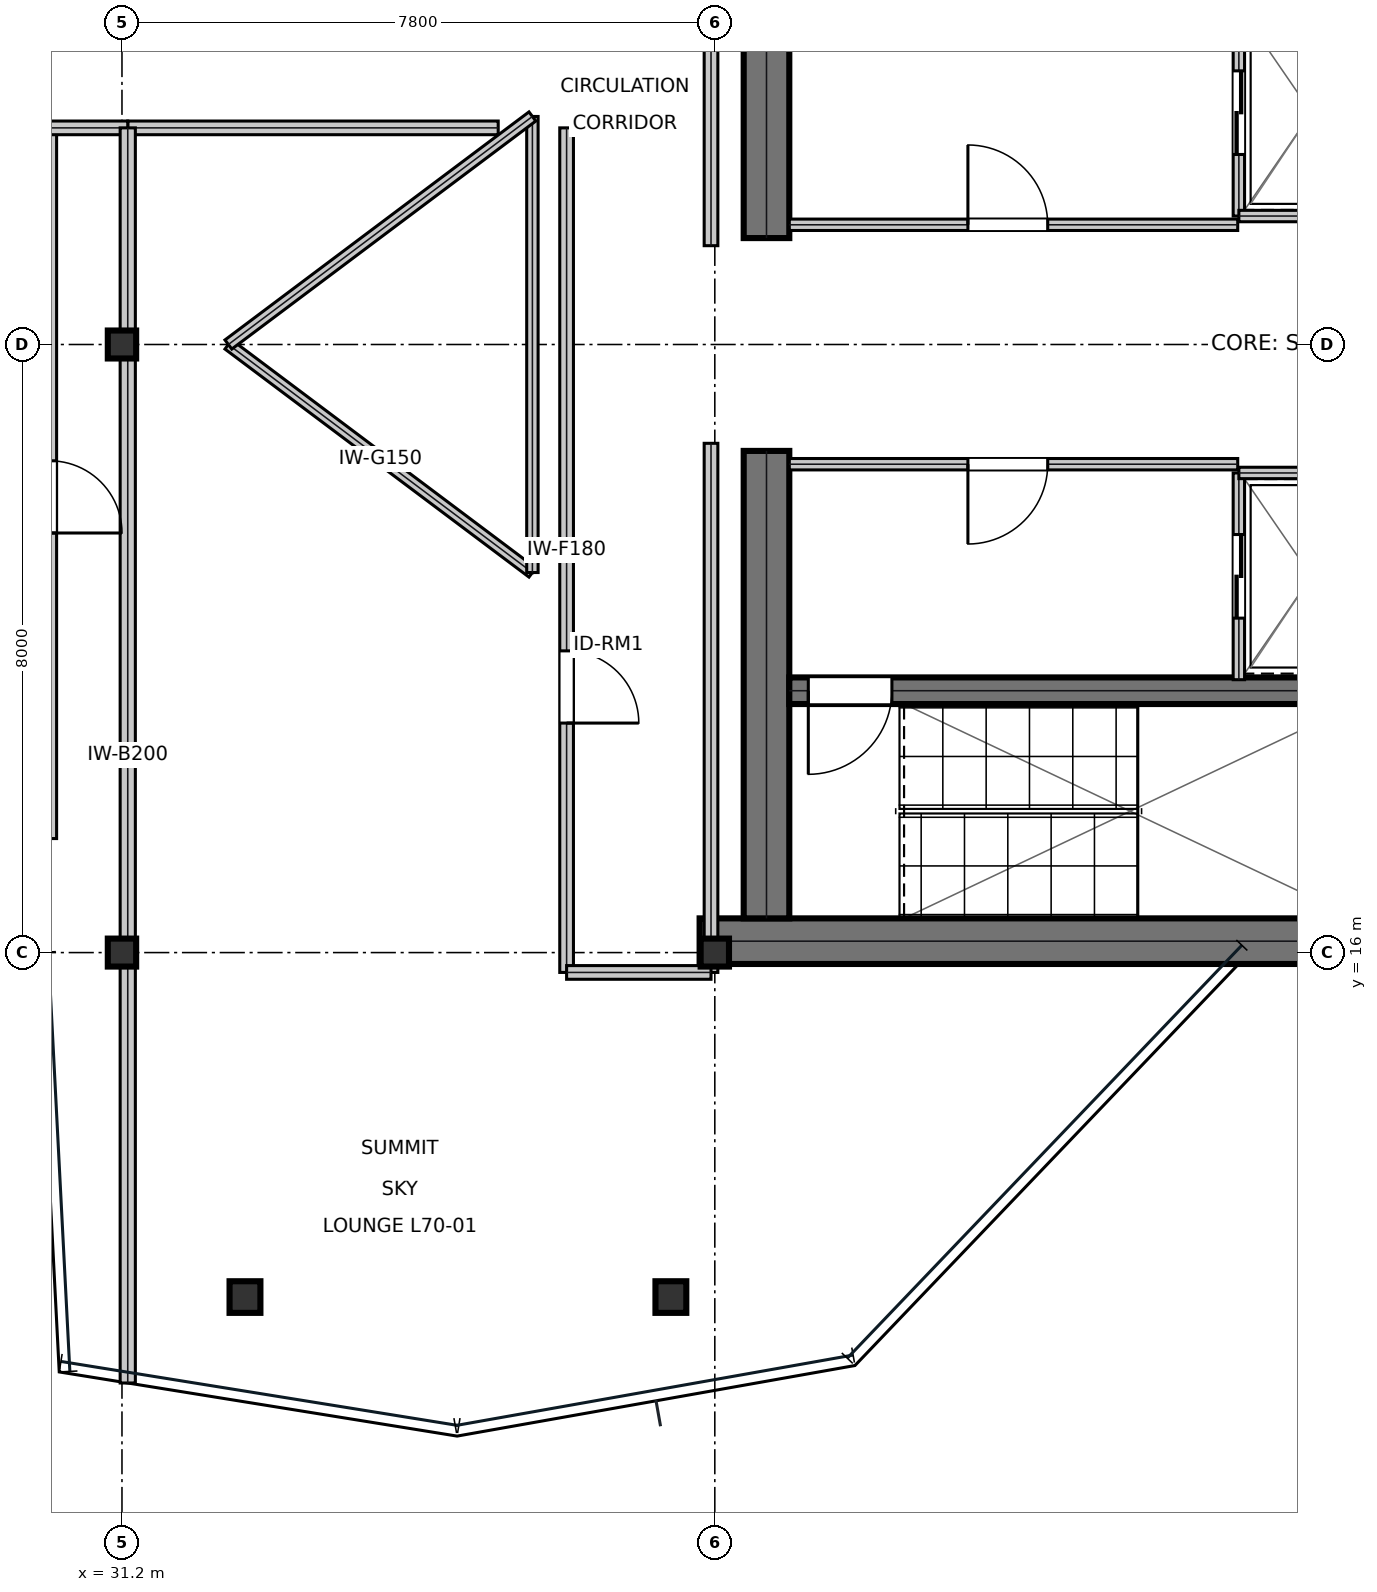
"""IFC4 building model, lengths in metres.
Left out: names, types, materials, properties, quantities, classifications, styles, units other than length and angle.
Written with IfcOpenShell. Run it as: python <this file> out.ifc"""

import sys

from ifc_helpers import new_model, si_unit, direction, frame, frame_2d, origin, origin_2d, place, context, subcontext, project, spatial, rectangle, i_section, extrude, element, fill, save


model = new_model("IFC4")
c1 = context("Model", 3, precision=1e-05, world=origin(), true_north=direction((0.0, 1.0)))
c2 = subcontext(c1, "Body", "Model", "MODEL_VIEW")
j1 = project(units=[si_unit("LENGTHUNIT", "METRE"), si_unit("PLANEANGLEUNIT", "RADIAN")], contexts=[c1])
p1 = place(None, origin())
s1 = spatial("IfcSite", under=j1, at=p1, CompositionType="ELEMENT")
p2 = place(p1, origin())
s2 = spatial("IfcBuilding", under=s1, at=p2, CompositionType="ELEMENT")
p3 = place(p2, frame((0.0, 0.0, 299.25)))
s3 = spatial("IfcBuildingStorey", under=s2, at=p3, CompositionType="ELEMENT", Elevation=299.25)
p4 = place(p3, frame((38.8, 16.15, 0.0), z_axis=(0.0, 0.0, 1.0), x_axis=(1.0, 0.0, 0.0)))
e1 = element("IfcWall", 1, at=p4, inside=s3, PredefinedType="SHEAR", context=c2, shape_type="SweptSolid", body=[
    extrude(rectangle(XDim=16.0, YDim=0.6, at=frame_2d((8.0, 0.0))), origin(), (0.0, 0.0, 1.0), 3.81),
])
for number, where, z_axis, x_axis in (
    (2, (39.68, 16.45, 0.0), (0.0, 0.0, 1.0), (0.0, 1.0, 0.0)),
    (3, (39.68, 25.4, 0.0), (0.0, 0.0, 1.0), (0.0, 1.0, 0.0)),
):
    element("IfcWall", number, at=place(p3, frame(where, z_axis=z_axis, x_axis=x_axis)), inside=s3, PredefinedType="SHEAR", context=c2, shape_type="SweptSolid", body=[
        extrude(rectangle(XDim=6.15, YDim=0.6, at=frame_2d((3.075, 0.0))), origin(), (0.0, 0.0, 1.0), 3.81),
    ])
p5 = place(p3, frame((39.98, 19.445, 0.0), z_axis=(0.0, 0.0, 1.0), x_axis=(1.0, 0.0, 0.0)))
e4 = element("IfcWall", 4, at=p5, inside=s3, PredefinedType="SHEAR", context=c2, shape_type="SweptSolid", body=[
    extrude(rectangle(XDim=7.71, YDim=0.35, at=frame_2d((3.855, 0.0))), origin(), (0.0, 0.0, 1.0), 3.81),
])
p6 = place(p5, frame((0.25, 0.0, 0.0)))
e5 = element("IfcOpeningElement", 5, at=p6, cuts=e4, PredefinedType="OPENING", context=c2, shape_type="SweptSolid", body=[
    extrude(rectangle(XDim=1.1, YDim=2.15, at=frame_2d((0.55, 1.075))), frame((0.0, 0.185, 0.0), z_axis=(0.0, -1.0, 0.0), x_axis=(1.0, 0.0, 0.0)), (0.0, 0.0, 1.0), 0.37),
])
for number, where, z_axis, x_axis in (
    (6, (31.2, 16.0, 0.0), (0.0, 0.0, 1.0), (1.0, 0.0, 0.0)),
    (7, (31.2, 24.0, 0.0), (0.0, 0.0, 1.0), (1.0, 0.0, 0.0)),
    (8, (39.0, 16.0, 0.0), (0.0, 0.0, 1.0), (1.0, 0.0, 0.0)),
):
    element("IfcColumn", number, at=place(p3, frame(where, z_axis=z_axis, x_axis=x_axis)), inside=s3, PredefinedType="COLUMN", context=c2, shape_type="SweptSolid", body=[
        extrude(i_section(OverallWidth=0.373, OverallDepth=0.368, WebThickness=0.015, FlangeThickness=0.024, at=origin_2d()), origin(), (0.0, 0.0, 1.0), 4.044),
    ])
p7 = place(p3, frame((32.818, 11.468, 0.016), z_axis=(0.013968236766, 0.029819148922, 0.999457706318), x_axis=(-0.905569653976, 0.424197597586, 0.0)))
e9 = element("IfcColumn", 9, at=p7, inside=s3, PredefinedType="COLUMN", context=c2, shape_type="SweptSolid", body=[
    extrude(i_section(OverallWidth=0.406, OverallDepth=0.416, WebThickness=0.03, FlangeThickness=0.048, at=origin_2d()), origin(), (0.0, 0.0, 1.0), 4.02),
])
p8 = place(p3, frame((38.422, 11.468, 0.016), z_axis=(-0.004980404192, 0.029821688517, 0.99954282673), x_axis=(-0.986339577116, -0.164724735893, 0.0)))
e10 = element("IfcColumn", 10, at=p8, inside=s3, PredefinedType="COLUMN", context=c2, shape_type="SweptSolid", body=[
    extrude(i_section(OverallWidth=0.406, OverallDepth=0.416, WebThickness=0.03, FlangeThickness=0.048, at=origin_2d()), origin(), (0.0, 0.0, 1.0), 4.02),
])
p9 = place(p3, frame((39.98, 25.575, 0.0), z_axis=(0.0, 0.0, 1.0), x_axis=(1.0, 0.0, 0.0)))
e11 = element("IfcWall", 11, at=p9, inside=s3, PredefinedType="PARTITIONING", context=c2, shape_type="SweptSolid", body=[
    extrude(rectangle(XDim=5.9, YDim=0.15, at=frame_2d((2.95, 0.0))), origin(), (0.0, 0.0, 1.0), 3.81),
])
p10 = place(p9, frame((2.35, 0.0, 0.0)))
e12 = element("IfcOpeningElement", 12, at=p10, cuts=e11, PredefinedType="OPENING", context=c2, shape_type="SweptSolid", body=[
    extrude(rectangle(XDim=1.05, YDim=2.15, at=frame_2d((0.525, 1.075))), frame((0.0, 0.085, 0.0), z_axis=(0.0, -1.0, 0.0), x_axis=(1.0, 0.0, 0.0)), (0.0, 0.0, 1.0), 0.17),
])
p11 = place(p3, frame((39.98, 22.425, 0.0), z_axis=(0.0, 0.0, 1.0), x_axis=(1.0, 0.0, 0.0)))
e13 = element("IfcWall", 13, at=p11, inside=s3, PredefinedType="PARTITIONING", context=c2, shape_type="SweptSolid", body=[
    extrude(rectangle(XDim=5.9, YDim=0.15, at=frame_2d((2.95, 0.0))), origin(), (0.0, 0.0, 1.0), 3.81),
])
p12 = place(p11, frame((2.35, 0.0, 0.0)))
e14 = element("IfcOpeningElement", 14, at=p12, cuts=e13, PredefinedType="OPENING", context=c2, shape_type="SweptSolid", body=[
    extrude(rectangle(XDim=1.05, YDim=2.15, at=frame_2d((0.525, 1.075))), frame((0.0, 0.085, 0.0), z_axis=(0.0, -1.0, 0.0), x_axis=(1.0, 0.0, 0.0)), (0.0, 0.0, 1.0), 0.17),
])
p13 = place(p3, frame((45.895, 25.69, 0.0), z_axis=(0.0, 0.0, 1.0), x_axis=(0.0, 1.0, 0.0)))
e15 = element("IfcWall", 15, at=p13, inside=s3, PredefinedType="PARTITIONING", context=c2, shape_type="SweptSolid", body=[
    extrude(rectangle(XDim=2.72, YDim=0.15, at=frame_2d((1.36, 0.0))), origin(), (0.0, 0.0, 1.0), 3.81),
])
p14 = place(p13, frame((0.81, 0.0, 0.0)))
e16 = element("IfcOpeningElement", 16, at=p14, cuts=e15, PredefinedType="OPENING", context=c2, shape_type="SweptSolid", body=[
    extrude(rectangle(XDim=1.1, YDim=2.15, at=frame_2d((0.55, 1.075))), frame((0.0, 0.085, 0.0), z_axis=(0.0, -1.0, 0.0), x_axis=(1.0, 0.0, 0.0)), (0.0, 0.0, 1.0), 0.17),
])
p15 = place(p3, frame((45.895, 25.69, 0.0), z_axis=(0.0, 0.0, 1.0), x_axis=(1.0, 0.0, 0.0)))
e17 = element("IfcWall", 17, at=p15, inside=s3, PredefinedType="PARTITIONING", context=c2, shape_type="SweptSolid", body=[
    extrude(rectangle(XDim=1.915, YDim=0.15, at=frame_2d((0.958, 0.0))), origin(), (0.0, 0.0, 1.0), 3.81),
])
p16 = place(p3, frame((45.895, 19.59, 0.0), z_axis=(0.0, 0.0, 1.0), x_axis=(0.0, 1.0, 0.0)))
e18 = element("IfcWall", 18, at=p16, inside=s3, PredefinedType="PARTITIONING", context=c2, shape_type="SweptSolid", body=[
    extrude(rectangle(XDim=2.72, YDim=0.15, at=frame_2d((1.36, 0.0))), origin(), (0.0, 0.0, 1.0), 3.81),
])
p17 = place(p16, frame((0.81, 0.0, 0.0)))
e19 = element("IfcOpeningElement", 19, at=p17, cuts=e18, PredefinedType="OPENING", context=c2, shape_type="SweptSolid", body=[
    extrude(rectangle(XDim=1.1, YDim=2.15, at=frame_2d((0.55, 1.075))), frame((0.0, 0.085, 0.0), z_axis=(0.0, -1.0, 0.0), x_axis=(1.0, 0.0, 0.0)), (0.0, 0.0, 1.0), 0.17),
])
p18 = place(p3, frame((45.895, 22.31, 0.0), z_axis=(0.0, 0.0, 1.0), x_axis=(1.0, 0.0, 0.0)))
e20 = element("IfcWall", 20, at=p18, inside=s3, PredefinedType="PARTITIONING", context=c2, shape_type="SweptSolid", body=[
    extrude(rectangle(XDim=1.915, YDim=0.15, at=frame_2d((0.958, 0.0))), origin(), (0.0, 0.0, 1.0), 3.81),
])
p19 = place(p3, frame((37.05, 15.739, 0.0), z_axis=(0.0, 0.0, 1.0), x_axis=(0.0, 1.0, 0.0)))
e21 = element("IfcWall", 21, at=p19, inside=s3, PredefinedType="SOLIDWALL", context=c2, shape_type="SweptSolid", body=[
    extrude(rectangle(XDim=11.111, YDim=0.18, at=frame_2d((5.556, 0.0))), origin(), (0.0, 0.0, 1.0), 3.27),
])
p20 = place(p19, frame((3.281, 0.0, 0.0)))
e22 = element("IfcOpeningElement", 22, at=p20, cuts=e21, PredefinedType="OPENING", context=c2, shape_type="SweptSolid", body=[
    extrude(rectangle(XDim=0.95, YDim=2.15, at=frame_2d((0.475, 1.075))), frame((0.0, 0.1, 0.0), z_axis=(0.0, -1.0, 0.0), x_axis=(1.0, 0.0, 0.0)), (0.0, 0.0, 1.0), 0.2),
])
p21 = place(p3, frame((30.25, 17.5, 0.0), z_axis=(0.0, 0.0, 1.0), x_axis=(0.0, 1.0, 0.0)))
e23 = element("IfcWall", 23, at=p21, inside=s3, PredefinedType="SOLIDWALL", context=c2, shape_type="SweptSolid", body=[
    extrude(rectangle(XDim=9.35, YDim=0.18, at=frame_2d((4.675, 0.0))), origin(), (0.0, 0.0, 1.0), 3.27),
])
p22 = place(p21, frame((4.02, 0.0, 0.0)))
e24 = element("IfcOpeningElement", 24, at=p22, cuts=e23, PredefinedType="OPENING", context=c2, shape_type="SweptSolid", body=[
    extrude(rectangle(XDim=0.95, YDim=2.15, at=frame_2d((0.475, 1.075))), frame((0.0, 0.1, 0.0), z_axis=(0.0, -1.0, 0.0), x_axis=(1.0, 0.0, 0.0)), (0.0, 0.0, 1.0), 0.2),
])
p23 = place(p3, frame((38.95, 15.739, 0.0), z_axis=(0.0, 0.0, 1.0), x_axis=(0.0, 1.0, 0.0)))
e25 = element("IfcWall", 25, at=p23, inside=s3, PredefinedType="SOLIDWALL", context=c2, shape_type="SweptSolid", body=[
    extrude(rectangle(XDim=6.961, YDim=0.18, at=frame_2d((3.48, 0.0))), origin(), (0.0, 0.0, 1.0), 3.27),
])
p24 = place(p3, frame((31.276, 26.85, 0.0), z_axis=(0.0, 0.0, 1.0), x_axis=(1.0, 0.0, 0.0)))
e26 = element("IfcWall", 26, at=p24, inside=s3, PredefinedType="SOLIDWALL", context=c2, shape_type="SweptSolid", body=[
    extrude(rectangle(XDim=4.874, YDim=0.18, at=frame_2d((2.437, 0.0))), origin(), (0.0, 0.0, 1.0), 3.81),
])
p25 = place(p3, frame((37.05, 15.739, 0.0), z_axis=(0.0, 0.0, 1.0), x_axis=(1.0, 0.0, 0.0)))
e27 = element("IfcWall", 27, at=p25, inside=s3, PredefinedType="SOLIDWALL", context=c2, shape_type="SweptSolid", body=[
    extrude(rectangle(XDim=1.9, YDim=0.18, at=frame_2d((0.95, 0.0))), origin(), (0.0, 0.0, 1.0), 3.27),
])
p26 = place(p3, frame((30.25, 26.85, 0.0), z_axis=(0.0, 0.0, 1.0), x_axis=(1.0, 0.0, 0.0)))
e28 = element("IfcWall", 28, at=p26, inside=s3, PredefinedType="SOLIDWALL", context=c2, shape_type="SweptSolid", body=[
    extrude(rectangle(XDim=1.026, YDim=0.18, at=frame_2d((0.513, 0.0))), origin(), (0.0, 0.0, 1.0), 3.27),
])
p27 = place(p3, frame((38.95, 25.3, 0.0), z_axis=(0.0, 0.0, 1.0), x_axis=(0.0, 1.0, 0.0)))
e29 = element("IfcWall", 29, at=p27, inside=s3, PredefinedType="SOLIDWALL", context=c2, shape_type="SweptSolid", body=[
    extrude(rectangle(XDim=6.961, YDim=0.18, at=frame_2d((3.48, 0.0))), origin(), (0.0, 0.0, 1.0), 3.27),
])
p28 = place(p3, frame((31.276, 10.337, 0.0), z_axis=(0.0, 0.0, 1.0), x_axis=(0.0, 1.0, 0.0)))
e30 = element("IfcWall", 30, at=p28, inside=s3, PredefinedType="SOLIDWALL", context=c2, shape_type="SweptSolid", body=[
    extrude(rectangle(XDim=16.513, YDim=0.2, at=frame_2d((8.256, 0.0))), origin(), (0.0, 0.0, 1.0), 3.27),
])
p29 = place(p3, frame((32.6, 24.0, 0.0), z_axis=(0.0, 0.0, 1.0), x_axis=(0.8, -0.6, 0.0)))
e31 = element("IfcWall", 31, at=p29, inside=s3, PredefinedType="MOVABLE", context=c2, shape_type="SweptSolid", body=[
    extrude(rectangle(XDim=5.0, YDim=0.15, at=frame_2d((2.5, 0.0))), origin(), (0.0, 0.0, 1.0), 3.81),
])
p30 = place(p3, frame((36.6, 21.0, 0.0), z_axis=(0.0, 0.0, 1.0), x_axis=(0.0, 1.0, 0.0)))
e32 = element("IfcWall", 32, at=p30, inside=s3, PredefinedType="MOVABLE", context=c2, shape_type="SweptSolid", body=[
    extrude(rectangle(XDim=6.0, YDim=0.15, at=frame_2d((3.0, 0.0))), origin(), (0.0, 0.0, 1.0), 3.81),
])
p31 = place(p3, frame((36.6, 27.0, 0.0), z_axis=(0.0, 0.0, 1.0), x_axis=(-0.8, -0.6, 0.0)))
e33 = element("IfcWall", 33, at=p31, inside=s3, PredefinedType="MOVABLE", context=c2, shape_type="SweptSolid", body=[
    extrude(rectangle(XDim=5.0, YDim=0.15, at=frame_2d((2.5, 0.0))), origin(), (0.0, 0.0, 1.0), 3.81),
])
p32 = place(p10, origin())
e34 = element("IfcDoor", 34, at=p32, inside=s3, OperationType="SINGLE_SWING_LEFT", PredefinedType="DOOR", context=c2, shape_type="SweptSolid", body=[
    extrude(rectangle(XDim=1.05, YDim=2.15, at=frame_2d((0.525, 1.075))), frame((0.0, 0.025, 0.0), z_axis=(0.0, -1.0, 0.0), x_axis=(1.0, 0.0, 0.0)), (0.0, 0.0, 1.0), 0.05),
])
fill(e12, e34)
p33 = place(p12, frame((1.05, 0.0, 0.0), z_axis=(0.0, 0.0, 1.0), x_axis=(-1.0, 0.0, 0.0)))
e35 = element("IfcDoor", 35, at=p33, inside=s3, OperationType="SINGLE_SWING_RIGHT", PredefinedType="DOOR", context=c2, shape_type="SweptSolid", body=[
    extrude(rectangle(XDim=1.05, YDim=2.15, at=frame_2d((0.525, 1.075))), frame((0.0, 0.025, 0.0), z_axis=(0.0, -1.0, 0.0), x_axis=(1.0, 0.0, 0.0)), (0.0, 0.0, 1.0), 0.05),
])
fill(e14, e35)
p34 = place(p14, frame((1.1, 0.0, 0.0), z_axis=(0.0, 0.0, 1.0), x_axis=(-1.0, 0.0, 0.0)))
e36 = element("IfcDoor", 36, at=p34, inside=s3, OperationType="DOUBLE_DOOR_SLIDING", PredefinedType="DOOR", context=c2, shape_type="SweptSolid", body=[
    extrude(rectangle(XDim=1.1, YDim=2.15, at=frame_2d((0.55, 1.075))), frame((0.0, 0.025, 0.0), z_axis=(0.0, -1.0, 0.0), x_axis=(1.0, 0.0, 0.0)), (0.0, 0.0, 1.0), 0.05),
])
fill(e16, e36)
p35 = place(p17, frame((1.1, 0.0, 0.0), z_axis=(0.0, 0.0, 1.0), x_axis=(-1.0, 0.0, 0.0)))
e37 = element("IfcDoor", 37, at=p35, inside=s3, OperationType="DOUBLE_DOOR_SLIDING", PredefinedType="DOOR", context=c2, shape_type="SweptSolid", body=[
    extrude(rectangle(XDim=1.1, YDim=2.15, at=frame_2d((0.55, 1.075))), frame((0.0, 0.025, 0.0), z_axis=(0.0, -1.0, 0.0), x_axis=(1.0, 0.0, 0.0)), (0.0, 0.0, 1.0), 0.05),
])
fill(e19, e37)
p36 = place(p20, frame((0.95, 0.0, 0.0), z_axis=(0.0, 0.0, 1.0), x_axis=(-1.0, 0.0, 0.0)))
e38 = element("IfcDoor", 38, at=p36, inside=s3, OperationType="SINGLE_SWING_RIGHT", PredefinedType="DOOR", context=c2, shape_type="SweptSolid", body=[
    extrude(rectangle(XDim=0.95, YDim=2.15, at=frame_2d((0.475, 1.075))), frame((0.0, 0.025, 0.0), z_axis=(0.0, -1.0, 0.0), x_axis=(1.0, 0.0, 0.0)), (0.0, 0.0, 1.0), 0.05),
])
fill(e22, e38)
p37 = place(p6, frame((1.1, 0.0, 0.0), z_axis=(0.0, 0.0, 1.0), x_axis=(-1.0, 0.0, 0.0)))
e39 = element("IfcDoor", 39, at=p37, inside=s3, OperationType="SINGLE_SWING_RIGHT", PredefinedType="DOOR", context=c2, shape_type="SweptSolid", body=[
    extrude(rectangle(XDim=1.1, YDim=2.15, at=frame_2d((0.55, 1.075))), frame((0.0, 0.025, 0.0), z_axis=(0.0, -1.0, 0.0), x_axis=(1.0, 0.0, 0.0)), (0.0, 0.0, 1.0), 0.05),
])
fill(e5, e39)
save(model, sys.argv[1])
